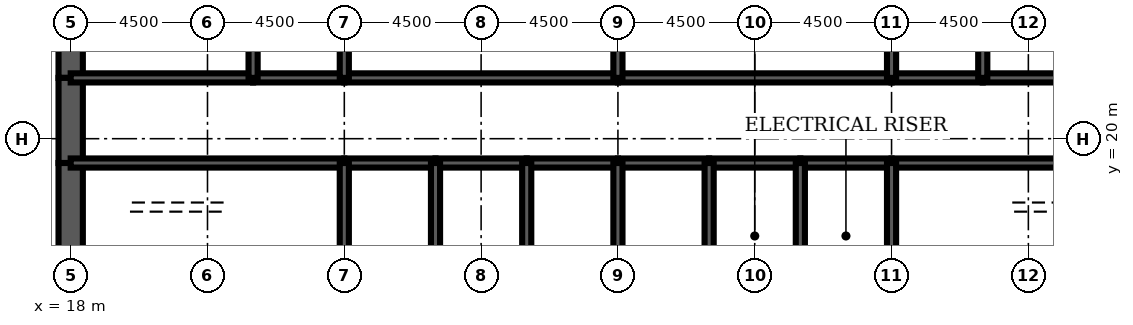
"""IFC4 building model, lengths in metres.
Left out: names, types, materials, properties, quantities, classifications, styles, units other than length and angle.
Written with IfcOpenShell. Run it as: python <this file> out.ifc"""

import sys

from ifc_helpers import new_model, si_unit, direction, frame, frame_2d, origin, place, context, subcontext, project, spatial, rectangle, extrude, element, fill, save


model = new_model("IFC4")
c1 = context("Model", 3, precision=1e-05, world=origin(), true_north=direction((0.0, 1.0)))
c2 = subcontext(c1, "Body", "Model", "MODEL_VIEW")
j1 = project(units=[si_unit("LENGTHUNIT", "METRE"), si_unit("PLANEANGLEUNIT", "RADIAN")], contexts=[c1])
p1 = place(None, origin())
s1 = spatial("IfcSite", under=j1, at=p1, CompositionType="ELEMENT")
p2 = place(p1, origin())
s2 = spatial("IfcBuilding", under=s1, at=p2, CompositionType="ELEMENT")
p3 = place(p2, frame((0.0, 0.0, 198.4)))
s3 = spatial("IfcBuildingStorey", under=s2, at=p3, CompositionType="ELEMENT", Elevation=198.4)
p4 = place(p3, frame((18.0, 26.0, 0.0), z_axis=(0.0, 0.0, 1.0), x_axis=(0.0, -1.0, 0.0)))
e1 = element("IfcWall", 1, at=p4, inside=s3, PredefinedType="SHEAR", context=c2, shape_type="SweptSolid", body=[
    extrude(rectangle(XDim=4.0, YDim=0.8, at=frame_2d((2.0, 0.0))), origin(), (0.0, 0.0, 1.0), 4.2),
])
p5 = place(p3, frame((18.0, 22.0, 0.0), z_axis=(0.0, 0.0, 1.0), x_axis=(0.0, -1.0, 0.0)))
e2 = element("IfcWall", 2, at=p5, inside=s3, PredefinedType="SHEAR", context=c2, shape_type="SweptSolid", body=[
    extrude(rectangle(XDim=2.8, YDim=0.8, at=frame_2d((1.4, 0.0))), origin(), (0.0, 0.0, 1.0), 4.2),
])
p6 = place(p5, frame((0.6, 0.0, 0.0)))
e3 = element("IfcOpeningElement", 3, at=p6, cuts=e2, PredefinedType="OPENING", context=c2, shape_type="SweptSolid", body=[
    extrude(rectangle(XDim=1.8, YDim=2.1, at=frame_2d((0.9, 1.05))), frame((0.0, 0.41, 0.0), z_axis=(0.0, -1.0, 0.0), x_axis=(1.0, 0.0, 0.0)), (0.0, 0.0, 1.0), 0.82),
])
p7 = place(p3, frame((18.0, 19.2, 0.0), z_axis=(0.0, 0.0, 1.0), x_axis=(0.0, -1.0, 0.0)))
e4 = element("IfcWall", 4, at=p7, inside=s3, PredefinedType="SHEAR", context=c2, shape_type="SweptSolid", body=[
    extrude(rectangle(XDim=3.2, YDim=0.8, at=frame_2d((1.6, 0.0))), origin(), (0.0, 0.0, 1.0), 4.2),
])
p8 = place(p3, frame((18.0, 19.2, 0.0), z_axis=(0.0, 0.0, 1.0), x_axis=(1.0, 0.0, 0.0)))
e5 = element("IfcWall", 5, at=p8, inside=s3, PredefinedType="SOLIDWALL", context=c2, shape_type="SweptSolid", body=[
    extrude(rectangle(XDim=9.0, YDim=0.3, at=frame_2d((4.5, 0.0))), origin(), (0.0, 0.0, 1.0), 4.2),
])
p9 = place(p8, frame((0.65, 0.0, 0.0)))
e6 = element("IfcOpeningElement", 6, at=p9, cuts=e5, PredefinedType="OPENING", context=c2, shape_type="SweptSolid", body=[
    extrude(rectangle(XDim=1.0, YDim=2.1, at=frame_2d((0.5, 1.05))), frame((0.0, 0.16, 0.0), z_axis=(0.0, -1.0, 0.0), x_axis=(1.0, 0.0, 0.0)), (0.0, 0.0, 1.0), 0.32),
])
p10 = place(p3, frame((27.0, 19.2, 0.0), z_axis=(0.0, 0.0, 1.0), x_axis=(1.0, 0.0, 0.0)))
e7 = element("IfcWall", 7, at=p10, inside=s3, PredefinedType="SOLIDWALL", context=c2, shape_type="SweptSolid", body=[
    extrude(rectangle(XDim=3.0, YDim=0.3, at=frame_2d((1.5, 0.0))), origin(), (0.0, 0.0, 1.0), 4.2),
])
p11 = place(p10, frame((0.95, 0.0, 0.0)))
e8 = element("IfcOpeningElement", 8, at=p11, cuts=e7, PredefinedType="OPENING", context=c2, shape_type="SweptSolid", body=[
    extrude(rectangle(XDim=1.1, YDim=2.2, at=frame_2d((0.55, 1.1))), frame((0.0, 0.16, 0.0), z_axis=(0.0, -1.0, 0.0), x_axis=(1.0, 0.0, 0.0)), (0.0, 0.0, 1.0), 0.32),
])
p12 = place(p3, frame((30.0, 19.2, 0.0), z_axis=(0.0, 0.0, 1.0), x_axis=(1.0, 0.0, 0.0)))
e9 = element("IfcWall", 9, at=p12, inside=s3, PredefinedType="SOLIDWALL", context=c2, shape_type="SweptSolid", body=[
    extrude(rectangle(XDim=3.0, YDim=0.3, at=frame_2d((1.5, 0.0))), origin(), (0.0, 0.0, 1.0), 4.2),
])
p13 = place(p12, frame((0.95, 0.0, 0.0)))
e10 = element("IfcOpeningElement", 10, at=p13, cuts=e9, PredefinedType="OPENING", context=c2, shape_type="SweptSolid", body=[
    extrude(rectangle(XDim=1.1, YDim=2.2, at=frame_2d((0.55, 1.1))), frame((0.0, 0.16, 0.0), z_axis=(0.0, -1.0, 0.0), x_axis=(1.0, 0.0, 0.0)), (0.0, 0.0, 1.0), 0.32),
])
p14 = place(p3, frame((33.0, 19.2, 0.0), z_axis=(0.0, 0.0, 1.0), x_axis=(1.0, 0.0, 0.0)))
e11 = element("IfcWall", 11, at=p14, inside=s3, PredefinedType="SOLIDWALL", context=c2, shape_type="SweptSolid", body=[
    extrude(rectangle(XDim=3.0, YDim=0.3, at=frame_2d((1.5, 0.0))), origin(), (0.0, 0.0, 1.0), 4.2),
])
p15 = place(p14, frame((0.95, 0.0, 0.0)))
e12 = element("IfcOpeningElement", 12, at=p15, cuts=e11, PredefinedType="OPENING", context=c2, shape_type="SweptSolid", body=[
    extrude(rectangle(XDim=1.1, YDim=2.2, at=frame_2d((0.55, 1.1))), frame((0.0, 0.16, 0.0), z_axis=(0.0, -1.0, 0.0), x_axis=(1.0, 0.0, 0.0)), (0.0, 0.0, 1.0), 0.32),
])
p16 = place(p3, frame((36.0, 19.2, 0.0), z_axis=(0.0, 0.0, 1.0), x_axis=(1.0, 0.0, 0.0)))
e13 = element("IfcWall", 13, at=p16, inside=s3, PredefinedType="SOLIDWALL", context=c2, shape_type="SweptSolid", body=[
    extrude(rectangle(XDim=3.0, YDim=0.3, at=frame_2d((1.5, 0.0))), origin(), (0.0, 0.0, 1.0), 4.2),
])
p17 = place(p16, frame((0.95, 0.0, 0.0)))
e14 = element("IfcOpeningElement", 14, at=p17, cuts=e13, PredefinedType="OPENING", context=c2, shape_type="SweptSolid", body=[
    extrude(rectangle(XDim=1.1, YDim=2.2, at=frame_2d((0.55, 1.1))), frame((0.0, 0.16, 0.0), z_axis=(0.0, -1.0, 0.0), x_axis=(1.0, 0.0, 0.0)), (0.0, 0.0, 1.0), 0.32),
])
p18 = place(p3, frame((39.0, 19.2, 0.0), z_axis=(0.0, 0.0, 1.0), x_axis=(1.0, 0.0, 0.0)))
e15 = element("IfcWall", 15, at=p18, inside=s3, PredefinedType="SOLIDWALL", context=c2, shape_type="SweptSolid", body=[
    extrude(rectangle(XDim=3.0, YDim=0.3, at=frame_2d((1.5, 0.0))), origin(), (0.0, 0.0, 1.0), 4.2),
])
p19 = place(p18, frame((1.0, 0.0, 0.0)))
e16 = element("IfcOpeningElement", 16, at=p19, cuts=e15, PredefinedType="OPENING", context=c2, shape_type="SweptSolid", body=[
    extrude(rectangle(XDim=1.0, YDim=2.1, at=frame_2d((0.5, 1.05))), frame((0.0, 0.16, 0.0), z_axis=(0.0, -1.0, 0.0), x_axis=(1.0, 0.0, 0.0)), (0.0, 0.0, 1.0), 0.32),
])
p20 = place(p3, frame((42.0, 19.2, 0.0), z_axis=(0.0, 0.0, 1.0), x_axis=(1.0, 0.0, 0.0)))
e17 = element("IfcWall", 17, at=p20, inside=s3, PredefinedType="SOLIDWALL", context=c2, shape_type="SweptSolid", body=[
    extrude(rectangle(XDim=3.0, YDim=0.3, at=frame_2d((1.5, 0.0))), origin(), (0.0, 0.0, 1.0), 4.2),
])
p21 = place(p20, frame((1.0, 0.0, 0.0)))
e18 = element("IfcOpeningElement", 18, at=p21, cuts=e17, PredefinedType="OPENING", context=c2, shape_type="SweptSolid", body=[
    extrude(rectangle(XDim=1.0, YDim=2.1, at=frame_2d((0.5, 1.05))), frame((0.0, 0.16, 0.0), z_axis=(0.0, -1.0, 0.0), x_axis=(1.0, 0.0, 0.0)), (0.0, 0.0, 1.0), 0.32),
])
p22 = place(p3, frame((45.0, 19.2, 0.0), z_axis=(0.0, 0.0, 1.0), x_axis=(1.0, 0.0, 0.0)))
e19 = element("IfcWall", 19, at=p22, inside=s3, PredefinedType="SOLIDWALL", context=c2, shape_type="SweptSolid", body=[
    extrude(rectangle(XDim=9.0, YDim=0.3, at=frame_2d((4.5, 0.0))), origin(), (0.0, 0.0, 1.0), 4.2),
])
p23 = place(p22, frame((7.35, 0.0, 0.0)))
e20 = element("IfcOpeningElement", 20, at=p23, cuts=e19, PredefinedType="OPENING", context=c2, shape_type="SweptSolid", body=[
    extrude(rectangle(XDim=1.0, YDim=2.1, at=frame_2d((0.5, 1.05))), frame((0.0, 0.16, 0.0), z_axis=(0.0, -1.0, 0.0), x_axis=(1.0, 0.0, 0.0)), (0.0, 0.0, 1.0), 0.32),
])
p24 = place(p3, frame((18.0, 22.0, 0.0), z_axis=(0.0, 0.0, 1.0), x_axis=(1.0, 0.0, 0.0)))
e21 = element("IfcWall", 21, at=p24, inside=s3, PredefinedType="SOLIDWALL", context=c2, shape_type="SweptSolid", body=[
    extrude(rectangle(XDim=6.0, YDim=0.3, at=frame_2d((3.0, 0.0))), origin(), (0.0, 0.0, 1.0), 4.2),
])
p25 = place(p24, frame((2.0, 0.0, 0.0)))
e22 = element("IfcOpeningElement", 22, at=p25, cuts=e21, PredefinedType="OPENING", context=c2, shape_type="SweptSolid", body=[
    extrude(rectangle(XDim=1.0, YDim=2.1, at=frame_2d((0.5, 1.05))), frame((0.0, 0.16, 0.0), z_axis=(0.0, -1.0, 0.0), x_axis=(1.0, 0.0, 0.0)), (0.0, 0.0, 1.0), 0.32),
])
p26 = place(p3, frame((24.0, 22.0, 0.0), z_axis=(0.0, 0.0, 1.0), x_axis=(1.0, 0.0, 0.0)))
e23 = element("IfcWall", 23, at=p26, inside=s3, PredefinedType="SOLIDWALL", context=c2, shape_type="SweptSolid", body=[
    extrude(rectangle(XDim=3.0, YDim=0.3, at=frame_2d((1.5, 0.0))), origin(), (0.0, 0.0, 1.0), 4.2),
])
p27 = place(p26, frame((1.0, 0.0, 0.0)))
e24 = element("IfcOpeningElement", 24, at=p27, cuts=e23, PredefinedType="OPENING", context=c2, shape_type="SweptSolid", body=[
    extrude(rectangle(XDim=1.0, YDim=2.1, at=frame_2d((0.5, 1.05))), frame((0.0, 0.16, 0.0), z_axis=(0.0, -1.0, 0.0), x_axis=(1.0, 0.0, 0.0)), (0.0, 0.0, 1.0), 0.32),
])
p28 = place(p3, frame((27.0, 22.0, 0.0), z_axis=(0.0, 0.0, 1.0), x_axis=(1.0, 0.0, 0.0)))
e25 = element("IfcWall", 25, at=p28, inside=s3, PredefinedType="SOLIDWALL", context=c2, shape_type="SweptSolid", body=[
    extrude(rectangle(XDim=9.0, YDim=0.3, at=frame_2d((4.5, 0.0))), origin(), (0.0, 0.0, 1.0), 4.2),
])
p29 = place(p28, frame((4.0, 0.0, 0.0)))
e26 = element("IfcOpeningElement", 26, at=p29, cuts=e25, PredefinedType="OPENING", context=c2, shape_type="SweptSolid", body=[
    extrude(rectangle(XDim=1.0, YDim=2.1, at=frame_2d((0.5, 1.05))), frame((0.0, 0.16, 0.0), z_axis=(0.0, -1.0, 0.0), x_axis=(1.0, 0.0, 0.0)), (0.0, 0.0, 1.0), 0.32),
])
p30 = place(p3, frame((36.0, 22.0, 0.0), z_axis=(0.0, 0.0, 1.0), x_axis=(1.0, 0.0, 0.0)))
e27 = element("IfcWall", 27, at=p30, inside=s3, PredefinedType="SOLIDWALL", context=c2, shape_type="SweptSolid", body=[
    extrude(rectangle(XDim=9.0, YDim=0.3, at=frame_2d((4.5, 0.0))), origin(), (0.0, 0.0, 1.0), 4.2),
])
p31 = place(p30, frame((4.0, 0.0, 0.0)))
e28 = element("IfcOpeningElement", 28, at=p31, cuts=e27, PredefinedType="OPENING", context=c2, shape_type="SweptSolid", body=[
    extrude(rectangle(XDim=1.0, YDim=2.1, at=frame_2d((0.5, 1.05))), frame((0.0, 0.16, 0.0), z_axis=(0.0, -1.0, 0.0), x_axis=(1.0, 0.0, 0.0)), (0.0, 0.0, 1.0), 0.32),
])
p32 = place(p3, frame((45.0, 22.0, 0.0), z_axis=(0.0, 0.0, 1.0), x_axis=(1.0, 0.0, 0.0)))
e29 = element("IfcWall", 29, at=p32, inside=s3, PredefinedType="SOLIDWALL", context=c2, shape_type="SweptSolid", body=[
    extrude(rectangle(XDim=3.0, YDim=0.3, at=frame_2d((1.5, 0.0))), origin(), (0.0, 0.0, 1.0), 4.2),
])
p33 = place(p32, frame((1.0, 0.0, 0.0)))
e30 = element("IfcOpeningElement", 30, at=p33, cuts=e29, PredefinedType="OPENING", context=c2, shape_type="SweptSolid", body=[
    extrude(rectangle(XDim=1.0, YDim=2.1, at=frame_2d((0.5, 1.05))), frame((0.0, 0.16, 0.0), z_axis=(0.0, -1.0, 0.0), x_axis=(1.0, 0.0, 0.0)), (0.0, 0.0, 1.0), 0.32),
])
p34 = place(p3, frame((48.0, 22.0, 0.0), z_axis=(0.0, 0.0, 1.0), x_axis=(1.0, 0.0, 0.0)))
e31 = element("IfcWall", 31, at=p34, inside=s3, PredefinedType="SOLIDWALL", context=c2, shape_type="SweptSolid", body=[
    extrude(rectangle(XDim=6.0, YDim=0.3, at=frame_2d((3.0, 0.0))), origin(), (0.0, 0.0, 1.0), 4.2),
])
p35 = place(p34, frame((2.0, 0.0, 0.0)))
e32 = element("IfcOpeningElement", 32, at=p35, cuts=e31, PredefinedType="OPENING", context=c2, shape_type="SweptSolid", body=[
    extrude(rectangle(XDim=1.0, YDim=2.1, at=frame_2d((0.5, 1.05))), frame((0.0, 0.16, 0.0), z_axis=(0.0, -1.0, 0.0), x_axis=(1.0, 0.0, 0.0)), (0.0, 0.0, 1.0), 0.32),
])
p36 = place(p34, frame((4.05, 0.0, 0.0)))
e33 = element("IfcOpeningElement", 33, at=p36, cuts=e31, PredefinedType="OPENING", context=c2, shape_type="SweptSolid", body=[
    extrude(rectangle(XDim=1.0, YDim=2.1, at=frame_2d((0.5, 1.05))), frame((0.0, 0.16, 0.0), z_axis=(0.0, -1.0, 0.0), x_axis=(1.0, 0.0, 0.0)), (0.0, 0.0, 1.0), 0.32),
])
for number, where, z_axis, x_axis in (
    (34, (27.0, 16.0, 0.0), (0.0, 0.0, 1.0), (0.0, 1.0, 0.0)),
    (35, (30.0, 16.0, 0.0), (0.0, 0.0, 1.0), (0.0, 1.0, 0.0)),
    (36, (33.0, 16.0, 0.0), (0.0, 0.0, 1.0), (0.0, 1.0, 0.0)),
    (37, (36.0, 16.0, 0.0), (0.0, 0.0, 1.0), (0.0, 1.0, 0.0)),
    (38, (39.0, 16.0, 0.0), (0.0, 0.0, 1.0), (0.0, 1.0, 0.0)),
    (39, (42.0, 16.0, 0.0), (0.0, 0.0, 1.0), (0.0, 1.0, 0.0)),
    (40, (45.0, 16.0, 0.0), (0.0, 0.0, 1.0), (0.0, 1.0, 0.0)),
):
    element("IfcWall", number, at=place(p3, frame(where, z_axis=z_axis, x_axis=x_axis)), inside=s3, PredefinedType="SOLIDWALL", context=c2, shape_type="SweptSolid", body=[
        extrude(rectangle(XDim=3.2, YDim=0.3, at=frame_2d((1.6, 0.0))), origin(), (0.0, 0.0, 1.0), 4.2),
    ])
for number, where, z_axis, x_axis in (
    (41, (24.0, 22.0, 0.0), (0.0, 0.0, 1.0), (0.0, 1.0, 0.0)),
    (42, (27.0, 22.0, 0.0), (0.0, 0.0, 1.0), (0.0, 1.0, 0.0)),
    (43, (36.0, 22.0, 0.0), (0.0, 0.0, 1.0), (0.0, 1.0, 0.0)),
    (44, (45.0, 22.0, 0.0), (0.0, 0.0, 1.0), (0.0, 1.0, 0.0)),
    (45, (48.0, 22.0, 0.0), (0.0, 0.0, 1.0), (0.0, 1.0, 0.0)),
):
    element("IfcWall", number, at=place(p3, frame(where, z_axis=z_axis, x_axis=x_axis)), inside=s3, PredefinedType="SOLIDWALL", context=c2, shape_type="SweptSolid", body=[
        extrude(rectangle(XDim=4.0, YDim=0.3, at=frame_2d((2.0, 0.0))), origin(), (0.0, 0.0, 1.0), 4.2),
    ])
p37 = place(p3, frame((39.15, 17.35, 0.0), z_axis=(0.0, 0.0, 1.0), x_axis=(1.0, 0.0, 0.0)))
e46 = element("IfcWall", 46, at=p37, inside=s3, PredefinedType="SOLIDWALL", context=c2, shape_type="SweptSolid", body=[
    extrude(rectangle(XDim=2.7, YDim=0.3, at=frame_2d((1.35, 0.0))), origin(), (0.0, 0.0, 1.0), 4.04),
])
p38 = place(p37, frame((0.85, 0.0, 0.0)))
e47 = element("IfcOpeningElement", 47, at=p38, cuts=e46, PredefinedType="OPENING", context=c2, shape_type="SweptSolid", body=[
    extrude(rectangle(XDim=1.0, YDim=2.1, at=frame_2d((0.5, 1.05))), frame((0.0, 0.16, 0.0), z_axis=(0.0, -1.0, 0.0), x_axis=(1.0, 0.0, 0.0)), (0.0, 0.0, 1.0), 0.32),
])
p39 = place(p3, frame((42.15, 17.35, 0.0), z_axis=(0.0, 0.0, 1.0), x_axis=(1.0, 0.0, 0.0)))
e48 = element("IfcWall", 48, at=p39, inside=s3, PredefinedType="SOLIDWALL", context=c2, shape_type="SweptSolid", body=[
    extrude(rectangle(XDim=2.7, YDim=0.3, at=frame_2d((1.35, 0.0))), origin(), (0.0, 0.0, 1.0), 4.04),
])
p40 = place(p39, frame((0.85, 0.0, 0.0)))
e49 = element("IfcOpeningElement", 49, at=p40, cuts=e48, PredefinedType="OPENING", context=c2, shape_type="SweptSolid", body=[
    extrude(rectangle(XDim=1.0, YDim=2.1, at=frame_2d((0.5, 1.05))), frame((0.0, 0.16, 0.0), z_axis=(0.0, -1.0, 0.0), x_axis=(1.0, 0.0, 0.0)), (0.0, 0.0, 1.0), 0.32),
])
p41 = place(p3, frame((42.0, 22.15, 0.0), z_axis=(0.0, 0.0, 1.0), x_axis=(0.0, 1.0, 0.0)))
e50 = element("IfcWall", 50, at=p41, inside=s3, PredefinedType="PARTITIONING", context=c2, shape_type="SweptSolid", body=[
    extrude(rectangle(XDim=3.7, YDim=0.15, at=frame_2d((1.85, 0.0))), origin(), (0.0, 0.0, 1.0), 3.0),
])
p42 = place(p41, frame((2.2, 0.0, 0.0)))
e51 = element("IfcOpeningElement", 51, at=p42, cuts=e50, PredefinedType="OPENING", context=c2, shape_type="SweptSolid", body=[
    extrude(rectangle(XDim=1.0, YDim=2.1, at=frame_2d((0.5, 1.05))), frame((0.0, 0.085, 0.0), z_axis=(0.0, -1.0, 0.0), x_axis=(1.0, 0.0, 0.0)), (0.0, 0.0, 1.0), 0.17),
])
p43 = place(p3, frame((49.4, 19.35, 0.0), z_axis=(0.0, 0.0, 1.0), x_axis=(0.0, 1.0, 0.0)))
e52 = element("IfcWall", 52, at=p43, inside=s3, PredefinedType="PARTITIONING", context=c2, shape_type="SweptSolid", body=[
    extrude(rectangle(XDim=2.5, YDim=0.15, at=frame_2d((1.25, 0.0))), origin(), (0.0, 0.0, 1.0), 3.0),
])
p44 = place(p43, frame((1.15, 0.0, 0.0)))
e53 = element("IfcOpeningElement", 53, at=p44, cuts=e52, PredefinedType="OPENING", context=c2, shape_type="SweptSolid", body=[
    extrude(rectangle(XDim=1.0, YDim=2.1, at=frame_2d((0.5, 1.05))), frame((0.0, 0.085, 0.0), z_axis=(0.0, -1.0, 0.0), x_axis=(1.0, 0.0, 0.0)), (0.0, 0.0, 1.0), 0.17),
])
p45 = place(p38, origin())
e54 = element("IfcDoor", 54, at=p45, inside=s3, OperationType="SINGLE_SWING_LEFT", PredefinedType="DOOR", context=c2, shape_type="SweptSolid", body=[
    extrude(rectangle(XDim=1.0, YDim=2.1, at=frame_2d((0.5, 1.05))), frame((0.0, 0.025, 0.0), z_axis=(0.0, -1.0, 0.0), x_axis=(1.0, 0.0, 0.0)), (0.0, 0.0, 1.0), 0.05),
])
fill(e47, e54)
p46 = place(p40, origin())
e55 = element("IfcDoor", 55, at=p46, inside=s3, OperationType="SINGLE_SWING_LEFT", PredefinedType="DOOR", context=c2, shape_type="SweptSolid", body=[
    extrude(rectangle(XDim=1.0, YDim=2.1, at=frame_2d((0.5, 1.05))), frame((0.0, 0.025, 0.0), z_axis=(0.0, -1.0, 0.0), x_axis=(1.0, 0.0, 0.0)), (0.0, 0.0, 1.0), 0.05),
])
fill(e49, e55)
p47 = place(p44, origin())
e56 = element("IfcDoor", 56, at=p47, inside=s3, OperationType="SINGLE_SWING_RIGHT", PredefinedType="DOOR", context=c2, shape_type="SweptSolid", body=[
    extrude(rectangle(XDim=1.0, YDim=2.1, at=frame_2d((0.5, 1.05))), frame((0.0, 0.025, 0.0), z_axis=(0.0, -1.0, 0.0), x_axis=(1.0, 0.0, 0.0)), (0.0, 0.0, 1.0), 0.05),
])
fill(e53, e56)
p48 = place(p11, origin())
e57 = element("IfcDoor", 57, at=p48, inside=s3, OperationType="DOUBLE_DOOR_SLIDING", PredefinedType="USERDEFINED", context=c2, shape_type="SweptSolid", body=[
    extrude(rectangle(XDim=1.1, YDim=2.2, at=frame_2d((0.55, 1.1))), frame((0.0, 0.025, 0.0), z_axis=(0.0, -1.0, 0.0), x_axis=(1.0, 0.0, 0.0)), (0.0, 0.0, 1.0), 0.05),
])
fill(e8, e57)
p49 = place(p13, origin())
e58 = element("IfcDoor", 58, at=p49, inside=s3, OperationType="DOUBLE_DOOR_SLIDING", PredefinedType="USERDEFINED", context=c2, shape_type="SweptSolid", body=[
    extrude(rectangle(XDim=1.1, YDim=2.2, at=frame_2d((0.55, 1.1))), frame((0.0, 0.025, 0.0), z_axis=(0.0, -1.0, 0.0), x_axis=(1.0, 0.0, 0.0)), (0.0, 0.0, 1.0), 0.05),
])
fill(e10, e58)
p50 = place(p15, origin())
e59 = element("IfcDoor", 59, at=p50, inside=s3, OperationType="DOUBLE_DOOR_SLIDING", PredefinedType="USERDEFINED", context=c2, shape_type="SweptSolid", body=[
    extrude(rectangle(XDim=1.1, YDim=2.2, at=frame_2d((0.55, 1.1))), frame((0.0, 0.025, 0.0), z_axis=(0.0, -1.0, 0.0), x_axis=(1.0, 0.0, 0.0)), (0.0, 0.0, 1.0), 0.05),
])
fill(e12, e59)
p51 = place(p17, origin())
e60 = element("IfcDoor", 60, at=p51, inside=s3, OperationType="DOUBLE_DOOR_SLIDING", PredefinedType="USERDEFINED", context=c2, shape_type="SweptSolid", body=[
    extrude(rectangle(XDim=1.1, YDim=2.2, at=frame_2d((0.55, 1.1))), frame((0.0, 0.025, 0.0), z_axis=(0.0, -1.0, 0.0), x_axis=(1.0, 0.0, 0.0)), (0.0, 0.0, 1.0), 0.05),
])
fill(e14, e60)
p52 = place(p9, origin())
e61 = element("IfcDoor", 61, at=p52, inside=s3, OperationType="SINGLE_SWING_LEFT", PredefinedType="DOOR", context=c2, shape_type="SweptSolid", body=[
    extrude(rectangle(XDim=1.0, YDim=2.1, at=frame_2d((0.5, 1.05))), frame((0.0, 0.025, 0.0), z_axis=(0.0, -1.0, 0.0), x_axis=(1.0, 0.0, 0.0)), (0.0, 0.0, 1.0), 0.05),
])
fill(e6, e61)
p53 = place(p6, origin())
e62 = element("IfcDoor", 62, at=p53, inside=s3, OperationType="SINGLE_SWING_LEFT", PredefinedType="DOOR", context=c2, shape_type="SweptSolid", body=[
    extrude(rectangle(XDim=1.8, YDim=2.1, at=frame_2d((0.9, 1.05))), frame((0.0, 0.4, 0.0), z_axis=(0.0, -1.0, 0.0), x_axis=(1.0, 0.0, 0.0)), (0.0, 0.0, 1.0), 0.8),
])
fill(e3, e62)
p54 = place(p25, origin())
e63 = element("IfcDoor", 63, at=p54, inside=s3, OperationType="SINGLE_SWING_LEFT", PredefinedType="DOOR", context=c2, shape_type="SweptSolid", body=[
    extrude(rectangle(XDim=1.0, YDim=2.1, at=frame_2d((0.5, 1.05))), frame((0.0, 0.025, 0.0), z_axis=(0.0, -1.0, 0.0), x_axis=(1.0, 0.0, 0.0)), (0.0, 0.0, 1.0), 0.05),
])
fill(e22, e63)
p55 = place(p27, origin())
e64 = element("IfcDoor", 64, at=p55, inside=s3, OperationType="SINGLE_SWING_LEFT", PredefinedType="DOOR", context=c2, shape_type="SweptSolid", body=[
    extrude(rectangle(XDim=1.0, YDim=2.1, at=frame_2d((0.5, 1.05))), frame((0.0, 0.025, 0.0), z_axis=(0.0, -1.0, 0.0), x_axis=(1.0, 0.0, 0.0)), (0.0, 0.0, 1.0), 0.05),
])
fill(e24, e64)
p56 = place(p29, origin())
e65 = element("IfcDoor", 65, at=p56, inside=s3, OperationType="SINGLE_SWING_LEFT", PredefinedType="DOOR", context=c2, shape_type="SweptSolid", body=[
    extrude(rectangle(XDim=1.0, YDim=2.1, at=frame_2d((0.5, 1.05))), frame((0.0, 0.025, 0.0), z_axis=(0.0, -1.0, 0.0), x_axis=(1.0, 0.0, 0.0)), (0.0, 0.0, 1.0), 0.05),
])
fill(e26, e65)
p57 = place(p31, origin())
e66 = element("IfcDoor", 66, at=p57, inside=s3, OperationType="SINGLE_SWING_LEFT", PredefinedType="DOOR", context=c2, shape_type="SweptSolid", body=[
    extrude(rectangle(XDim=1.0, YDim=2.1, at=frame_2d((0.5, 1.05))), frame((0.0, 0.025, 0.0), z_axis=(0.0, -1.0, 0.0), x_axis=(1.0, 0.0, 0.0)), (0.0, 0.0, 1.0), 0.05),
])
fill(e28, e66)
p58 = place(p33, origin())
e67 = element("IfcDoor", 67, at=p58, inside=s3, OperationType="SINGLE_SWING_LEFT", PredefinedType="DOOR", context=c2, shape_type="SweptSolid", body=[
    extrude(rectangle(XDim=1.0, YDim=2.1, at=frame_2d((0.5, 1.05))), frame((0.0, 0.025, 0.0), z_axis=(0.0, -1.0, 0.0), x_axis=(1.0, 0.0, 0.0)), (0.0, 0.0, 1.0), 0.05),
])
fill(e30, e67)
p59 = place(p35, origin())
e68 = element("IfcDoor", 68, at=p59, inside=s3, OperationType="SINGLE_SWING_LEFT", PredefinedType="DOOR", context=c2, shape_type="SweptSolid", body=[
    extrude(rectangle(XDim=1.0, YDim=2.1, at=frame_2d((0.5, 1.05))), frame((0.0, 0.025, 0.0), z_axis=(0.0, -1.0, 0.0), x_axis=(1.0, 0.0, 0.0)), (0.0, 0.0, 1.0), 0.05),
])
fill(e32, e68)
p60 = place(p19, origin())
e69 = element("IfcDoor", 69, at=p60, inside=s3, OperationType="SINGLE_SWING_LEFT", PredefinedType="DOOR", context=c2, shape_type="SweptSolid", body=[
    extrude(rectangle(XDim=1.0, YDim=2.1, at=frame_2d((0.5, 1.05))), frame((0.0, 0.025, 0.0), z_axis=(0.0, -1.0, 0.0), x_axis=(1.0, 0.0, 0.0)), (0.0, 0.0, 1.0), 0.05),
])
fill(e16, e69)
p61 = place(p21, origin())
e70 = element("IfcDoor", 70, at=p61, inside=s3, OperationType="SINGLE_SWING_LEFT", PredefinedType="DOOR", context=c2, shape_type="SweptSolid", body=[
    extrude(rectangle(XDim=1.0, YDim=2.1, at=frame_2d((0.5, 1.05))), frame((0.0, 0.025, 0.0), z_axis=(0.0, -1.0, 0.0), x_axis=(1.0, 0.0, 0.0)), (0.0, 0.0, 1.0), 0.05),
])
fill(e18, e70)
save(model, sys.argv[1])
